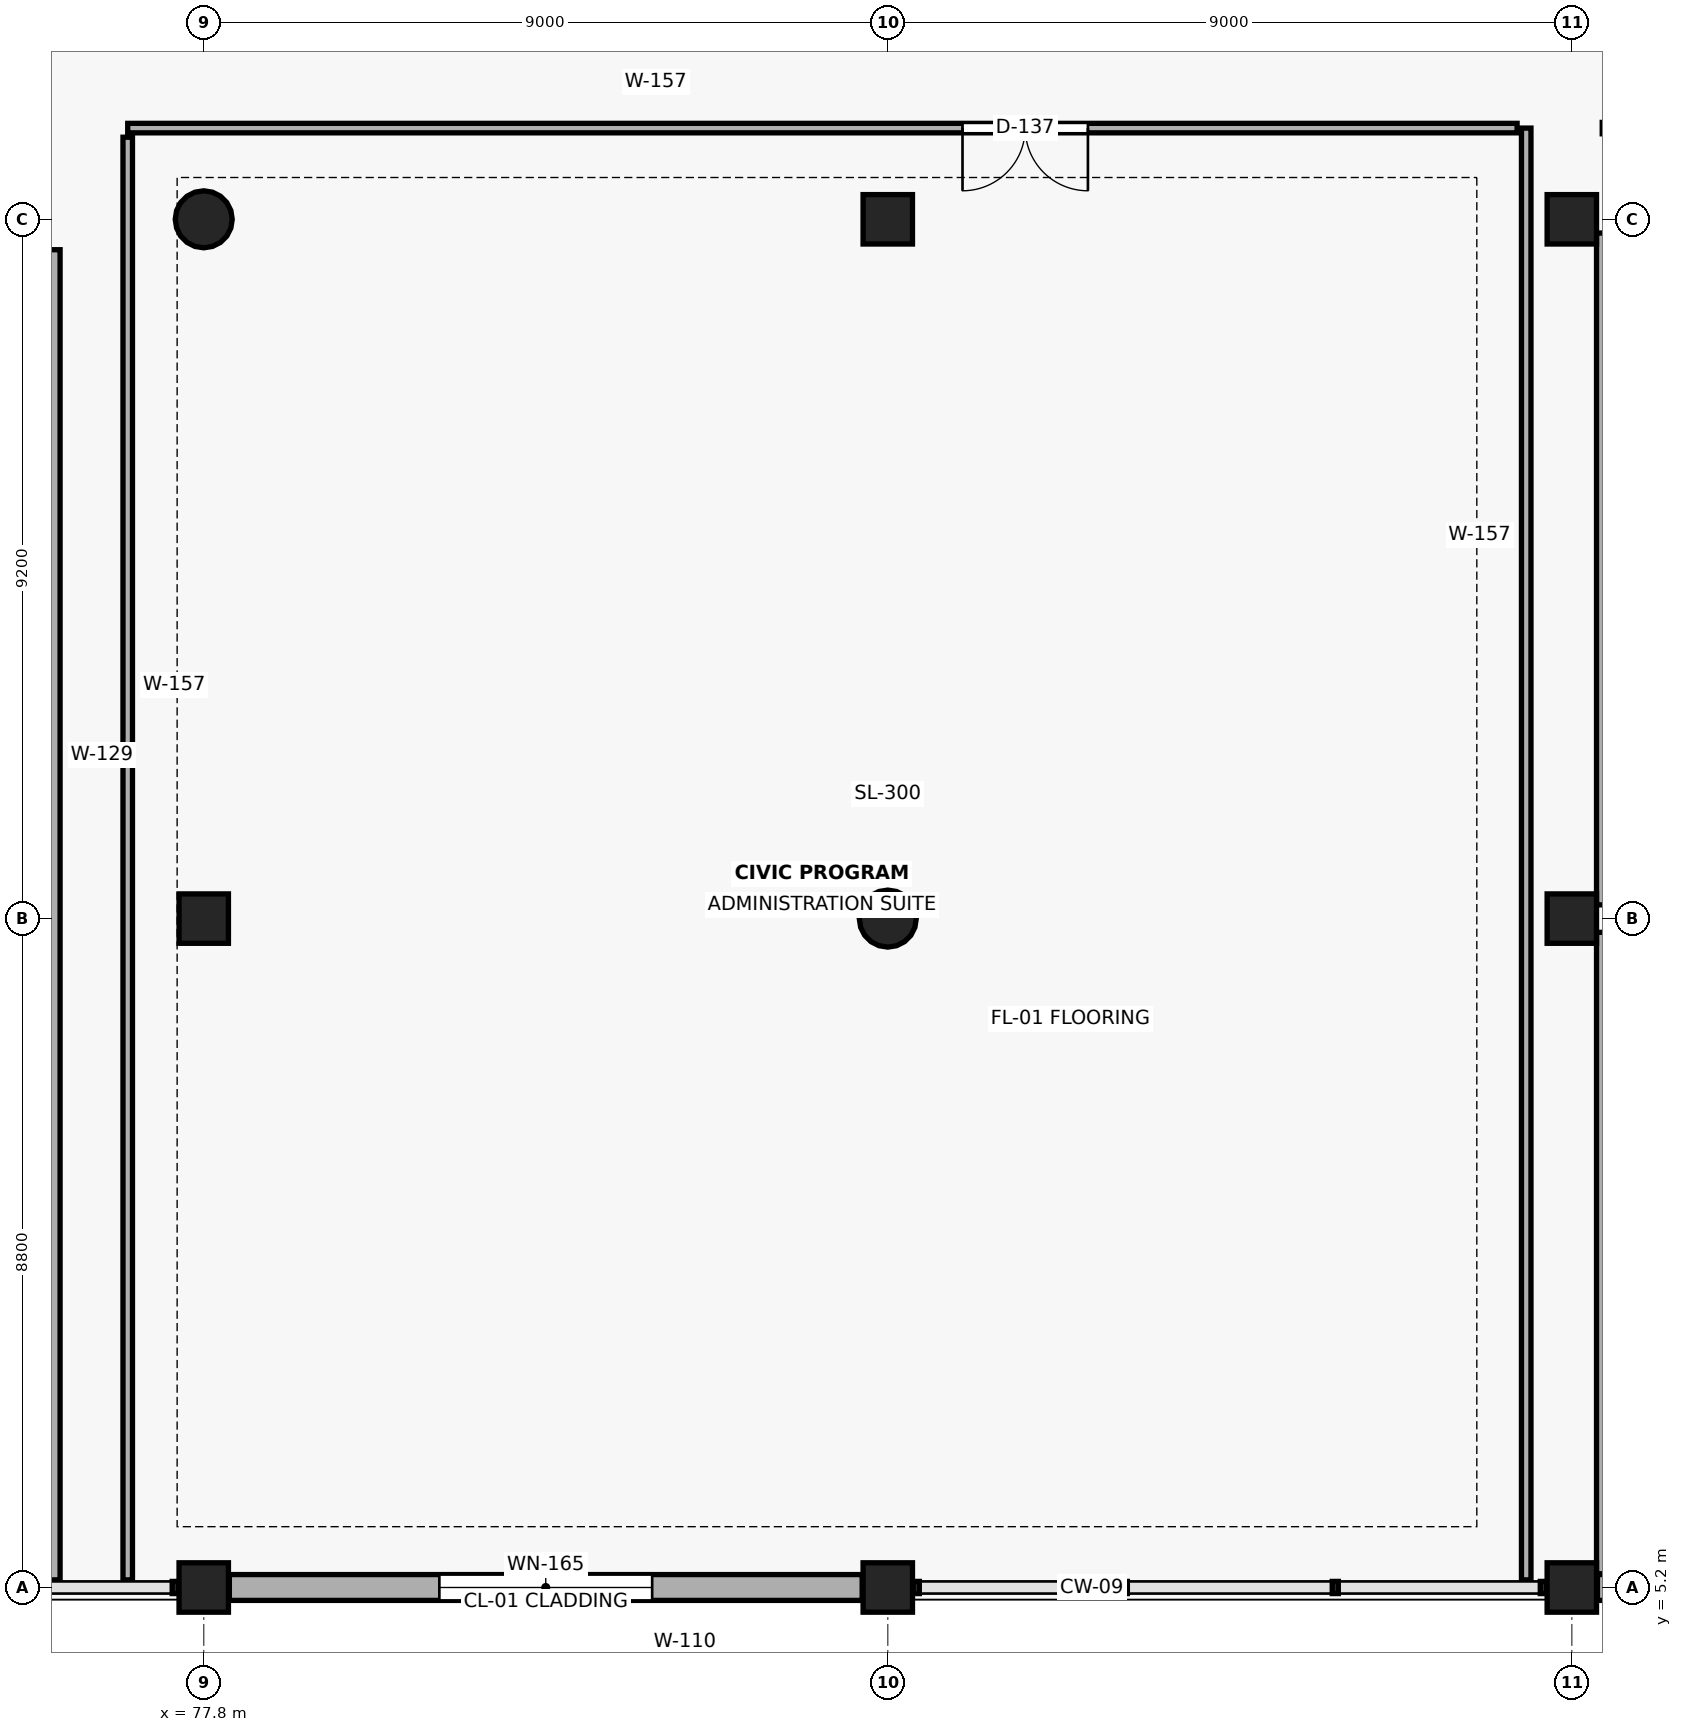
"""IFC4 building model, lengths in metres.
Left out: names, types, materials, properties, quantities, classifications, styles, units other than length and angle.
Written with IfcOpenShell. Run it as: python <this file> out.ifc"""

import sys

from ifc_helpers import new_model, si_unit, direction, frame, frame_2d, origin, origin_2d, place, context, subcontext, project, spatial, rectangle, circle, extrude, element, fill, save


model = new_model("IFC4")
c1 = context("Model", 3, precision=1e-05, world=origin(), true_north=direction((0.0, 1.0)))
c2 = subcontext(c1, "Body", "Model", "MODEL_VIEW")
j1 = project(units=[si_unit("LENGTHUNIT", "METRE"), si_unit("PLANEANGLEUNIT", "RADIAN")], contexts=[c1])
p1 = place(None, origin())
s1 = spatial("IfcSite", under=j1, at=p1, CompositionType="ELEMENT")
p2 = place(p1, origin())
s2 = spatial("IfcBuilding", under=s1, at=p2, CompositionType="ELEMENT")
p3 = place(p2, frame((0.0, 0.0, 5.1)))
s3 = spatial("IfcBuildingStorey", under=s2, at=p3, CompositionType="ELEMENT", Elevation=5.1)
for number, where, z_axis, x_axis in (
    (1, (77.8, 5.2, 0.0), (0.0, 0.0, 1.0), (1.0, 0.0, 0.0)),
    (2, (77.8, 14.0, 0.0), (0.0, 0.0, 1.0), (1.0, 0.0, 0.0)),
):
    element("IfcColumn", number, at=place(p3, frame(where, z_axis=z_axis, x_axis=x_axis)), inside=s3, PredefinedType="COLUMN", context=c2, shape_type="SweptSolid", body=[
        extrude(rectangle(XDim=0.65, YDim=0.65, at=origin_2d()), origin(), (0.0, 0.0, 1.0), 4.8),
    ])
p4 = place(p3, frame((77.8, 23.2, 0.0), z_axis=(0.0, 0.0, 1.0), x_axis=(1.0, 0.0, 0.0)))
e3 = element("IfcColumn", 3, at=p4, inside=s3, PredefinedType="COLUMN", context=c2, shape_type="SweptSolid", body=[
    extrude(circle(Radius=0.375, at=origin_2d()), origin(), (0.0, 0.0, 1.0), 4.8),
])
p5 = place(p3, frame((86.8, 5.2, 0.0), z_axis=(0.0, 0.0, 1.0), x_axis=(1.0, 0.0, 0.0)))
e4 = element("IfcColumn", 4, at=p5, inside=s3, PredefinedType="COLUMN", context=c2, shape_type="SweptSolid", body=[
    extrude(rectangle(XDim=0.65, YDim=0.65, at=origin_2d()), origin(), (0.0, 0.0, 1.0), 4.8),
])
p6 = place(p3, frame((86.8, 14.0, 0.0), z_axis=(0.0, 0.0, 1.0), x_axis=(1.0, 0.0, 0.0)))
e5 = element("IfcColumn", 5, at=p6, inside=s3, PredefinedType="COLUMN", context=c2, shape_type="SweptSolid", body=[
    extrude(circle(Radius=0.375, at=origin_2d()), origin(), (0.0, 0.0, 1.0), 4.8),
])
for number, where, z_axis, x_axis in (
    (6, (86.8, 23.2, 0.0), (0.0, 0.0, 1.0), (1.0, 0.0, 0.0)),
    (7, (95.8, 5.2, 0.0), (0.0, 0.0, 1.0), (1.0, 0.0, 0.0)),
    (8, (95.8, 14.0, 0.0), (0.0, 0.0, 1.0), (1.0, 0.0, 0.0)),
    (9, (95.8, 23.2, 0.0), (0.0, 0.0, 1.0), (1.0, 0.0, 0.0)),
):
    element("IfcColumn", number, at=place(p3, frame(where, z_axis=z_axis, x_axis=x_axis)), inside=s3, PredefinedType="COLUMN", context=c2, shape_type="SweptSolid", body=[
        extrude(rectangle(XDim=0.65, YDim=0.65, at=origin_2d()), origin(), (0.0, 0.0, 1.0), 4.8),
    ])
p7 = place(p3, frame((86.463, 5.2, 0.0), z_axis=(0.0, 0.0, 1.0), x_axis=(-1.0, 0.0, 0.0)))
e10 = element("IfcWall", 10, at=p7, inside=s3, PredefinedType="SOLIDWALL", context=c2, shape_type="SweptSolid", body=[
    extrude(rectangle(XDim=8.326, YDim=0.34, at=frame_2d((4.163, 0.0))), origin(), (0.0, 0.0, 1.0), 3.61),
])
p8 = place(p7, frame((2.763, 0.0, 0.85)))
e11 = element("IfcOpeningElement", 11, at=p8, cuts=e10, PredefinedType="OPENING", context=c2, shape_type="SweptSolid", body=[
    extrude(rectangle(XDim=2.8, YDim=2.45, at=frame_2d((1.4, 1.225))), frame((0.0, 0.182, 0.0), z_axis=(0.0, -1.0, 0.0), x_axis=(1.0, 0.0, 0.0)), (0.0, 0.0, 1.0), 0.364),
])
p9 = place(p3, frame((104.663, 5.2, 0.0), z_axis=(0.0, 0.0, 1.0), x_axis=(-1.0, 0.0, 0.0)))
e12 = element("IfcWall", 12, at=p9, inside=s3, PredefinedType="SOLIDWALL", context=c2, shape_type="SweptSolid", body=[
    extrude(rectangle(XDim=8.526, YDim=0.34, at=frame_2d((4.263, 0.0))), origin(), (0.0, 0.0, 1.0), 3.61),
])
p10 = place(p9, frame((2.863, 0.0, 0.85)))
e13 = element("IfcOpeningElement", 13, at=p10, cuts=e12, PredefinedType="OPENING", context=c2, shape_type="SweptSolid", body=[
    extrude(rectangle(XDim=2.8, YDim=2.45, at=frame_2d((1.4, 1.225))), frame((0.0, 0.182, 0.0), z_axis=(0.0, -1.0, 0.0), x_axis=(1.0, 0.0, 0.0)), (0.0, 0.0, 1.0), 0.364),
])
p11 = place(p3, frame((75.8, 5.3, 0.0), z_axis=(0.0, 0.0, 1.0), x_axis=(0.0, 1.0, 0.0)))
e14 = element("IfcWall", 14, at=p11, inside=s3, PredefinedType="PARTITIONING", context=c2, shape_type="SweptSolid", body=[
    extrude(rectangle(XDim=17.5, YDim=0.22, at=frame_2d((8.75, 0.0))), origin(), (0.0, 0.0, 1.0), 4.47),
])
p12 = place(p3, frame((95.2, 5.3, 0.0), z_axis=(0.0, 0.0, 1.0), x_axis=(0.0, 1.0, 0.0)))
e15 = element("IfcWall", 15, at=p12, inside=s3, PredefinedType="PARTITIONING", context=c2, shape_type="SweptSolid", body=[
    extrude(rectangle(XDim=19.1, YDim=0.125, at=frame_2d((9.55, 0.0))), origin(), (0.0, 0.0, 1.0), 4.47),
])
p13 = place(p3, frame((95.08, 24.4, 0.0), z_axis=(0.0, 0.0, 1.0), x_axis=(-1.0, 0.0, 0.0)))
e16 = element("IfcWall", 16, at=p13, inside=s3, PredefinedType="PARTITIONING", context=c2, shape_type="SweptSolid", body=[
    extrude(rectangle(XDim=18.28, YDim=0.125, at=frame_2d((9.14, 0.0))), origin(), (0.0, 0.0, 1.0), 4.47),
])
p14 = place(p13, frame((5.647, 0.0, 0.0)))
e17 = element("IfcOpeningElement", 17, at=p14, cuts=e16, PredefinedType="OPENING", context=c2, shape_type="SweptSolid", body=[
    extrude(rectangle(XDim=1.65, YDim=2.35, at=frame_2d((0.825, 1.175))), frame((0.0, 0.074, 0.0), z_axis=(0.0, -1.0, 0.0), x_axis=(1.0, 0.0, 0.0)), (0.0, 0.0, 1.0), 0.149),
])
p15 = place(p3, frame((76.8, 24.28, 0.0), z_axis=(0.0, 0.0, 1.0), x_axis=(0.0, -1.0, 0.0)))
e18 = element("IfcWall", 18, at=p15, inside=s3, PredefinedType="PARTITIONING", context=c2, shape_type="SweptSolid", body=[
    extrude(rectangle(XDim=18.98, YDim=0.125, at=frame_2d((9.49, 0.0))), origin(), (0.0, 0.0, 1.0), 4.47),
])
p16 = place(p3, frame((96.2, 23.02, 0.0), z_axis=(0.0, 0.0, 1.0), x_axis=(0.0, -1.0, 0.0)))
e19 = element("IfcWall", 19, at=p16, inside=s3, PredefinedType="PARTITIONING", context=c2, shape_type="SweptSolid", body=[
    extrude(rectangle(XDim=8.839, YDim=0.15, at=frame_2d((4.419, 0.0))), origin(), (0.0, 0.0, 1.0), 4.47),
])
p17 = place(p3, frame((96.2, 13.819, 0.0), z_axis=(0.0, 0.0, 1.0), x_axis=(0.0, -1.0, 0.0)))
e20 = element("IfcWall", 20, at=p17, inside=s3, PredefinedType="PARTITIONING", context=c2, shape_type="SweptSolid", body=[
    extrude(rectangle(XDim=8.439, YDim=0.15, at=frame_2d((4.219, 0.0))), origin(), (0.0, 0.0, 1.0), 4.47),
])
p18 = place(p8, origin())
e21 = element("IfcWindow", 21, at=p18, inside=s3, PartitioningType="SINGLE_PANEL", PredefinedType="WINDOW", context=c2, shape_type="SweptSolid", body=[
    extrude(rectangle(XDim=2.8, YDim=2.45, at=frame_2d((1.4, 1.225))), frame((0.0, 0.03, 0.0), z_axis=(0.0, -1.0, 0.0), x_axis=(1.0, 0.0, 0.0)), (0.0, 0.0, 1.0), 0.06),
])
fill(e11, e21)
p19 = place(p14, origin())
e22 = element("IfcDoor", 22, at=p19, inside=s3, OperationType="DOUBLE_DOOR_SINGLE_SWING", PredefinedType="DOOR", context=c2, shape_type="SweptSolid", body=[
    extrude(rectangle(XDim=1.65, YDim=2.35, at=frame_2d((0.825, 1.175))), frame((0.0, 0.025, 0.0), z_axis=(0.0, -1.0, 0.0), x_axis=(1.0, 0.0, 0.0)), (0.0, 0.0, 1.0), 0.05),
])
fill(e17, e22)
save(model, sys.argv[1])
